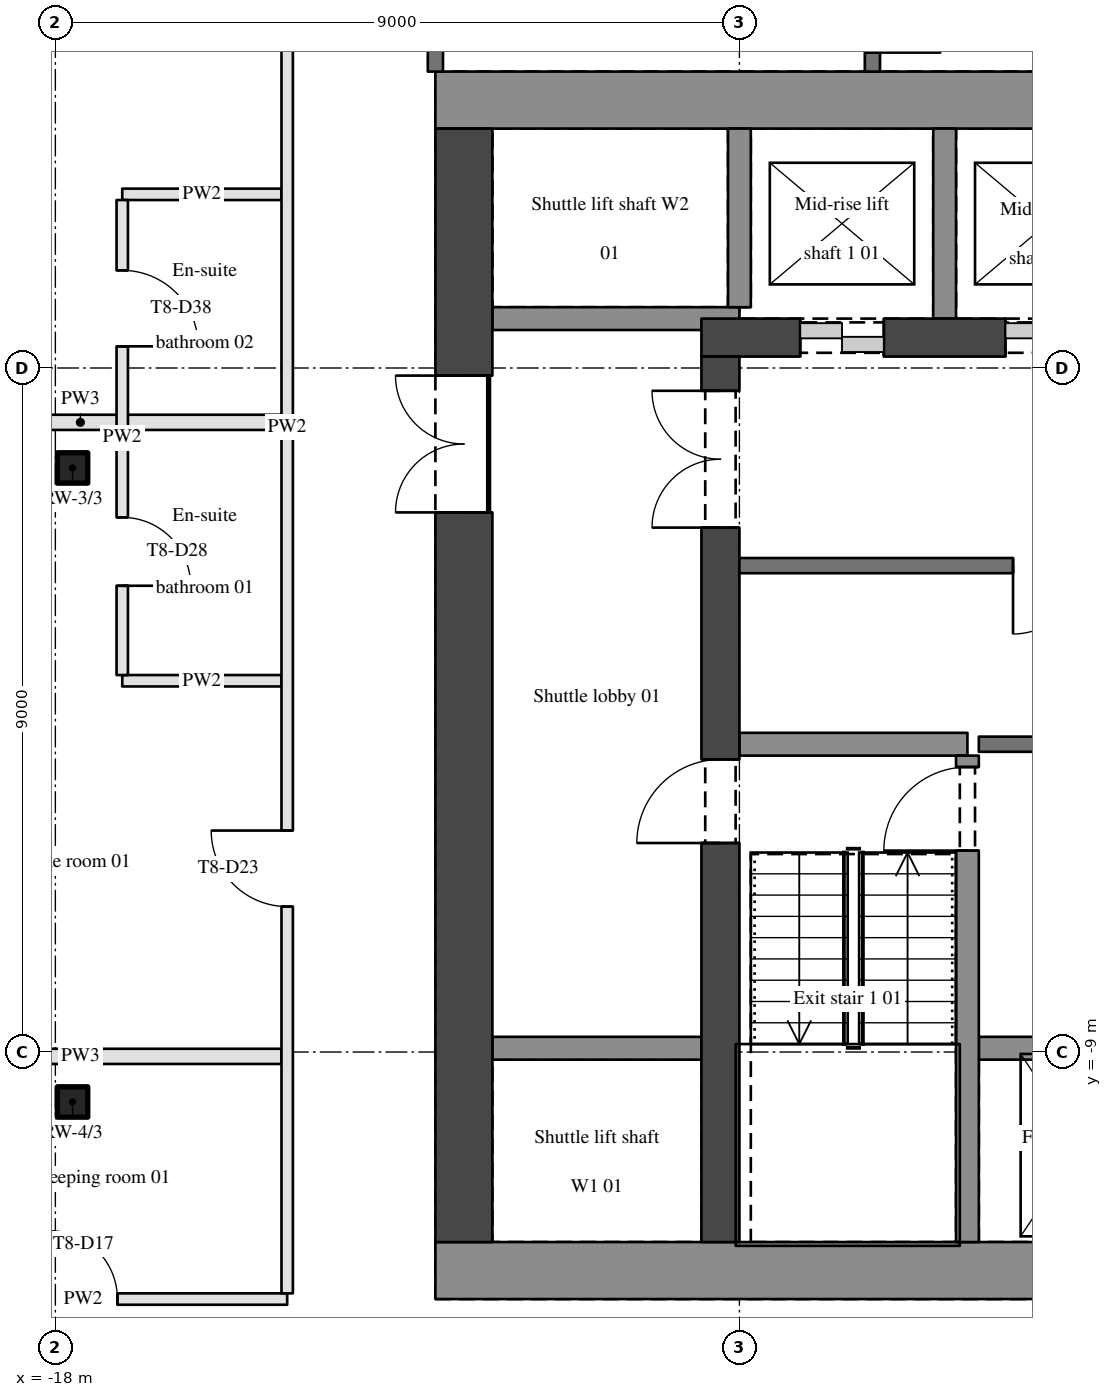
"""IFC4 building model, lengths in metres.
Left out: names, types, materials, properties, quantities, classifications, styles, units other than length and angle.
Written with IfcOpenShell. Run it as: python <this file> out.ifc"""

import sys

from ifc_helpers import new_model, si_unit, direction, frame, frame_2d, origin, origin_2d, place, context, subcontext, project, spatial, rectangle, hollow_rectangle, extrude, element, fill, save


model = new_model("IFC4")
c1 = context("Model", 3, precision=1e-05, world=origin(), true_north=direction((0.0, 1.0)))
c2 = subcontext(c1, "Body", "Model", "MODEL_VIEW")
j1 = project(units=[si_unit("LENGTHUNIT", "METRE"), si_unit("PLANEANGLEUNIT", "RADIAN")], contexts=[c1])
p1 = place(None, origin())
s1 = spatial("IfcSite", under=j1, at=p1, CompositionType="ELEMENT")
p2 = place(p1, origin())
s2 = spatial("IfcBuilding", under=s1, at=p2, CompositionType="ELEMENT")
p3 = place(p2, frame((0.0, 0.0, 121.5)))
s3 = spatial("IfcBuildingStorey", under=s2, at=p3, CompositionType="ELEMENT", Elevation=121.5)
for number, where, z_axis, x_axis in (
    (1, (-17.774, -1.315, 0.0), (0.0, 0.0, 1.0), (1.0, 0.0, 0.0)),
    (2, (-17.774, -9.657, 0.0), (0.0, 0.0, 1.0), (1.0, 0.0, 0.0)),
):
    element("IfcColumn", number, at=place(p3, frame(where, z_axis=z_axis, x_axis=x_axis)), inside=s3, PredefinedType="COLUMN", context=c2, shape_type="SweptSolid", body=[
        extrude(hollow_rectangle(XDim=0.4, YDim=0.4, WallThickness=0.02, InnerFilletRadius=0.03, OuterFilletRadius=0.05, at=origin_2d()), origin(), (0.0, 0.0, 1.0), 3.4),
    ])
for number, where, z_axis, x_axis in (
    (3, (-13.0, -11.875, 0.0), (0.0, 0.0, 1.0), (1.0, 0.0, 0.0)),
    (4, (-13.0, 3.525, 0.0), (0.0, 0.0, 1.0), (1.0, 0.0, 0.0)),
):
    element("IfcWall", number, at=place(p3, frame(where, z_axis=z_axis, x_axis=x_axis)), inside=s3, PredefinedType="SHEAR", context=c2, shape_type="SweptSolid", body=[
        extrude(rectangle(XDim=26.0, YDim=0.75, at=frame_2d((13.0, 0.0))), origin(), (0.0, 0.0, 1.0), 3.4),
    ])
p4 = place(p3, frame((-12.625, -11.5, 0.0), z_axis=(0.0, 0.0, 1.0), x_axis=(0.0, 1.0, 0.0)))
e5 = element("IfcWall", 5, at=p4, inside=s3, PredefinedType="SHEAR", context=c2, shape_type="SweptSolid", body=[
    extrude(rectangle(XDim=14.65, YDim=0.75, at=frame_2d((7.325, 0.0))), origin(), (0.0, 0.0, 1.0), 3.4),
])
p5 = place(p4, frame((9.6, 0.0, 0.0)))
e6 = element("IfcOpeningElement", 6, at=p5, cuts=e5, PredefinedType="OPENING", context=c2, shape_type="SweptSolid", body=[
    extrude(rectangle(XDim=1.8, YDim=2.1, at=frame_2d((0.9, 1.05))), frame((0.0, 0.385, 0.0), z_axis=(0.0, -1.0, 0.0), x_axis=(1.0, 0.0, 0.0)), (0.0, 0.0, 1.0), 0.77),
])
p6 = place(p3, frame((-9.5, 0.4, 0.0), z_axis=(0.0, 0.0, 1.0), x_axis=(1.0, 0.0, 0.0)))
e7 = element("IfcWall", 7, at=p6, inside=s3, PredefinedType="SHEAR", context=c2, shape_type="SweptSolid", body=[
    extrude(rectangle(XDim=19.0, YDim=0.5, at=frame_2d((9.5, 0.0))), origin(), (0.0, 0.0, 1.0), 3.4),
])
p7 = place(p6, frame((1.3, 0.0, 0.0)))
e8 = element("IfcOpeningElement", 8, at=p7, cuts=e7, PredefinedType="OPENING", context=c2, shape_type="SweptSolid", body=[
    extrude(rectangle(XDim=1.1, YDim=2.1, at=frame_2d((0.55, 1.05))), frame((0.0, 0.26, 0.0), z_axis=(0.0, -1.0, 0.0), x_axis=(1.0, 0.0, 0.0)), (0.0, 0.0, 1.0), 0.52),
])
p8 = place(p6, frame((4.0, 0.0, 0.0)))
e9 = element("IfcOpeningElement", 9, at=p8, cuts=e7, PredefinedType="OPENING", context=c2, shape_type="SweptSolid", body=[
    extrude(rectangle(XDim=1.1, YDim=2.1, at=frame_2d((0.55, 1.05))), frame((0.0, 0.26, 0.0), z_axis=(0.0, -1.0, 0.0), x_axis=(1.0, 0.0, 0.0)), (0.0, 0.0, 1.0), 0.52),
])
p9 = place(p6, frame((6.7, 0.0, 0.0)))
e10 = element("IfcOpeningElement", 10, at=p9, cuts=e7, PredefinedType="OPENING", context=c2, shape_type="SweptSolid", body=[
    extrude(rectangle(XDim=1.1, YDim=2.1, at=frame_2d((0.55, 1.05))), frame((0.0, 0.26, 0.0), z_axis=(0.0, -1.0, 0.0), x_axis=(1.0, 0.0, 0.0)), (0.0, 0.0, 1.0), 0.52),
])
p10 = place(p6, frame((11.2, 0.0, 0.0)))
e11 = element("IfcOpeningElement", 11, at=p10, cuts=e7, PredefinedType="OPENING", context=c2, shape_type="SweptSolid", body=[
    extrude(rectangle(XDim=1.1, YDim=2.1, at=frame_2d((0.55, 1.05))), frame((0.0, 0.26, 0.0), z_axis=(0.0, -1.0, 0.0), x_axis=(1.0, 0.0, 0.0)), (0.0, 0.0, 1.0), 0.52),
])
p11 = place(p6, frame((13.9, 0.0, 0.0)))
e12 = element("IfcOpeningElement", 12, at=p11, cuts=e7, PredefinedType="OPENING", context=c2, shape_type="SweptSolid", body=[
    extrude(rectangle(XDim=1.1, YDim=2.1, at=frame_2d((0.55, 1.05))), frame((0.0, 0.26, 0.0), z_axis=(0.0, -1.0, 0.0), x_axis=(1.0, 0.0, 0.0)), (0.0, 0.0, 1.0), 0.52),
])
p12 = place(p6, frame((16.6, 0.0, 0.0)))
e13 = element("IfcOpeningElement", 13, at=p12, cuts=e7, PredefinedType="OPENING", context=c2, shape_type="SweptSolid", body=[
    extrude(rectangle(XDim=1.1, YDim=2.1, at=frame_2d((0.55, 1.05))), frame((0.0, 0.26, 0.0), z_axis=(0.0, -1.0, 0.0), x_axis=(1.0, 0.0, 0.0)), (0.0, 0.0, 1.0), 0.52),
])
p13 = place(p3, frame((-9.25, -11.5, 0.0), z_axis=(0.0, 0.0, 1.0), x_axis=(0.0, 1.0, 0.0)))
e14 = element("IfcWall", 14, at=p13, inside=s3, PredefinedType="SHEAR", context=c2, shape_type="SweptSolid", body=[
    extrude(rectangle(XDim=11.65, YDim=0.5, at=frame_2d((5.825, 0.0))), origin(), (0.0, 0.0, 1.0), 3.4),
])
p14 = place(p13, frame((9.4, 0.0, 0.0)))
e15 = element("IfcOpeningElement", 15, at=p14, cuts=e14, PredefinedType="OPENING", context=c2, shape_type="SweptSolid", body=[
    extrude(rectangle(XDim=1.8, YDim=2.1, at=frame_2d((0.9, 1.05))), frame((0.0, 0.26, 0.0), z_axis=(0.0, -1.0, 0.0), x_axis=(1.0, 0.0, 0.0)), (0.0, 0.0, 1.0), 0.52),
])
p15 = place(p13, frame((5.25, 0.0, 0.0)))
e16 = element("IfcOpeningElement", 16, at=p15, cuts=e14, PredefinedType="OPENING", context=c2, shape_type="SweptSolid", body=[
    extrude(rectangle(XDim=1.1, YDim=2.1, at=frame_2d((0.55, 1.05))), frame((0.0, 0.26, 0.0), z_axis=(0.0, -1.0, 0.0), x_axis=(1.0, 0.0, 0.0)), (0.0, 0.0, 1.0), 0.52),
])
p16 = place(p3, frame((-20.317, -12.25, 0.0), z_axis=(0.0, 0.0, 1.0), x_axis=(1.0, 0.0, 0.0)))
e17 = element("IfcWall", 17, at=p16, inside=s3, PredefinedType="PARTITIONING", context=c2, shape_type="SweptSolid", body=[
    extrude(rectangle(XDim=5.367, YDim=0.15, at=frame_2d((2.684, 0.0))), origin(), (0.0, 0.0, 1.0), 2.46),
])
p17 = place(p16, frame((2.233, 0.0, 0.0)))
e18 = element("IfcOpeningElement", 18, at=p17, cuts=e17, PredefinedType="OPENING", context=c2, shape_type="SweptSolid", body=[
    extrude(rectangle(XDim=0.9, YDim=2.1, at=frame_2d((0.45, 1.05))), frame((0.0, 0.085, 0.0), z_axis=(0.0, -1.0, 0.0), x_axis=(1.0, 0.0, 0.0)), (0.0, 0.0, 1.0), 0.17),
])
p18 = place(p3, frame((-20.317, -9.057, 0.0), z_axis=(0.0, 0.0, 1.0), x_axis=(1.0, 0.0, 0.0)))
e19 = element("IfcWall", 19, at=p18, inside=s3, PredefinedType="PARTITIONING", context=c2, shape_type="SweptSolid", body=[
    extrude(rectangle(XDim=5.292, YDim=0.2, at=frame_2d((2.646, 0.0))), origin(), (0.0, 0.0, 1.0), 2.46),
])
p19 = place(p3, frame((-12.25, -8.95, 0.0), z_axis=(0.0, 0.0, 1.0), x_axis=(1.0, 0.0, 0.0)))
e20 = element("IfcWall", 20, at=p19, inside=s3, PredefinedType="SHEAR", context=c2, shape_type="SweptSolid", body=[
    extrude(rectangle(XDim=2.75, YDim=0.3, at=frame_2d((1.375, 0.0))), origin(), (0.0, 0.0, 1.0), 3.4),
])
p20 = place(p3, frame((-5.85, -8.95, 0.0), z_axis=(0.0, 0.0, 1.0), x_axis=(1.0, 0.0, 0.0)))
e21 = element("IfcWall", 21, at=p20, inside=s3, PredefinedType="SHEAR", context=c2, shape_type="SweptSolid", body=[
    extrude(rectangle(XDim=11.7, YDim=0.3, at=frame_2d((5.85, 0.0))), origin(), (0.0, 0.0, 1.0), 3.4),
])
p21 = place(p20, frame((0.8, 0.0, 0.0)))
e22 = element("IfcOpeningElement", 22, at=p21, cuts=e21, PredefinedType="OPENING", context=c2, shape_type="SweptSolid", body=[
    extrude(rectangle(XDim=1.1, YDim=2.1, at=frame_2d((0.55, 1.05))), frame((0.0, 0.16, 0.0), z_axis=(0.0, -1.0, 0.0), x_axis=(1.0, 0.0, 0.0)), (0.0, 0.0, 1.0), 0.32),
])
p22 = place(p20, frame((3.8, 0.0, 0.0)))
e23 = element("IfcOpeningElement", 23, at=p22, cuts=e21, PredefinedType="OPENING", context=c2, shape_type="SweptSolid", body=[
    extrude(rectangle(XDim=1.1, YDim=2.1, at=frame_2d((0.55, 1.05))), frame((0.0, 0.16, 0.0), z_axis=(0.0, -1.0, 0.0), x_axis=(1.0, 0.0, 0.0)), (0.0, 0.0, 1.0), 0.32),
])
p23 = place(p20, frame((6.8, 0.0, 0.0)))
e24 = element("IfcOpeningElement", 24, at=p23, cuts=e21, PredefinedType="OPENING", context=c2, shape_type="SweptSolid", body=[
    extrude(rectangle(XDim=1.1, YDim=2.1, at=frame_2d((0.55, 1.05))), frame((0.0, 0.16, 0.0), z_axis=(0.0, -1.0, 0.0), x_axis=(1.0, 0.0, 0.0)), (0.0, 0.0, 1.0), 0.32),
])
p24 = place(p20, frame((9.8, 0.0, 0.0)))
e25 = element("IfcOpeningElement", 25, at=p24, cuts=e21, PredefinedType="OPENING", context=c2, shape_type="SweptSolid", body=[
    extrude(rectangle(XDim=1.1, YDim=2.1, at=frame_2d((0.55, 1.05))), frame((0.0, 0.16, 0.0), z_axis=(0.0, -1.0, 0.0), x_axis=(1.0, 0.0, 0.0)), (0.0, 0.0, 1.0), 0.32),
])
p25 = place(p3, frame((-9.0, -4.95, 0.0), z_axis=(0.0, 0.0, 1.0), x_axis=(1.0, 0.0, 0.0)))
e26 = element("IfcWall", 26, at=p25, inside=s3, PredefinedType="SHEAR", context=c2, shape_type="SweptSolid", body=[
    extrude(rectangle(XDim=3.0, YDim=0.3, at=frame_2d((1.5, 0.0))), origin(), (0.0, 0.0, 1.0), 3.4),
])
p26 = place(p3, frame((-5.85, -4.95, 0.0), z_axis=(0.0, 0.0, 1.0), x_axis=(1.0, 0.0, 0.0)))
e27 = element("IfcWall", 27, at=p26, inside=s3, PredefinedType="SOLIDWALL", context=c2, shape_type="SweptSolid", body=[
    extrude(rectangle(XDim=4.95, YDim=0.2, at=frame_2d((2.475, 0.0))), origin(), (0.0, 0.0, 1.0), 3.1),
])
p27 = place(p3, frame((-17.12, -4.115, 0.0), z_axis=(0.0, 0.0, 1.0), x_axis=(1.0, 0.0, 0.0)))
e28 = element("IfcWall", 28, at=p27, inside=s3, PredefinedType="PARTITIONING", context=c2, shape_type="SweptSolid", body=[
    extrude(rectangle(XDim=2.095, YDim=0.15, at=frame_2d((1.048, 0.0))), origin(), (0.0, 0.0, 1.0), 2.46),
])
p28 = place(p3, frame((9.0, -2.6, 0.0), z_axis=(0.0, 0.0, 1.0), x_axis=(-1.0, 0.0, 0.0)))
e29 = element("IfcWall", 29, at=p28, inside=s3, PredefinedType="SOLIDWALL", context=c2, shape_type="SweptSolid", body=[
    extrude(rectangle(XDim=18.0, YDim=0.2, at=frame_2d((9.0, 0.0))), origin(), (0.0, 0.0, 1.0), 3.1),
])
p29 = place(p28, frame((8.5, 0.0, 0.0)))
e30 = element("IfcOpeningElement", 30, at=p29, cuts=e29, PredefinedType="OPENING", context=c2, shape_type="SweptSolid", body=[
    extrude(rectangle(XDim=1.0, YDim=2.1, at=frame_2d((0.5, 1.05))), frame((0.0, 0.11, 0.0), z_axis=(0.0, -1.0, 0.0), x_axis=(1.0, 0.0, 0.0)), (0.0, 0.0, 1.0), 0.22),
])
p30 = place(p28, frame((13.5, 0.0, 0.0)))
e31 = element("IfcOpeningElement", 31, at=p30, cuts=e29, PredefinedType="OPENING", context=c2, shape_type="SweptSolid", body=[
    extrude(rectangle(XDim=0.9, YDim=2.1, at=frame_2d((0.45, 1.05))), frame((0.0, 0.11, 0.0), z_axis=(0.0, -1.0, 0.0), x_axis=(1.0, 0.0, 0.0)), (0.0, 0.0, 1.0), 0.22),
])
p31 = place(p28, frame((3.6, 0.0, 0.0)))
e32 = element("IfcOpeningElement", 32, at=p31, cuts=e29, PredefinedType="OPENING", context=c2, shape_type="SweptSolid", body=[
    extrude(rectangle(XDim=0.9, YDim=2.1, at=frame_2d((0.45, 1.05))), frame((0.0, 0.11, 0.0), z_axis=(0.0, -1.0, 0.0), x_axis=(1.0, 0.0, 0.0)), (0.0, 0.0, 1.0), 0.22),
])
p32 = place(p3, frame((-20.317, -0.715, 0.0), z_axis=(0.0, 0.0, 1.0), x_axis=(1.0, 0.0, 0.0)))
e33 = element("IfcWall", 33, at=p32, inside=s3, PredefinedType="PARTITIONING", context=c2, shape_type="SweptSolid", body=[
    extrude(rectangle(XDim=5.292, YDim=0.2, at=frame_2d((2.646, 0.0))), origin(), (0.0, 0.0, 1.0), 2.46),
])
p33 = place(p3, frame((-9.0, 0.65, 0.0), z_axis=(0.0, 0.0, 1.0), x_axis=(-1.0, 0.0, 0.0)))
e34 = element("IfcWall", 34, at=p33, inside=s3, PredefinedType="SHEAR", context=c2, shape_type="SweptSolid", body=[
    extrude(rectangle(XDim=3.25, YDim=0.3, at=frame_2d((1.625, 0.0))), origin(), (0.0, 0.0, 1.0), 3.4),
])
p34 = place(p3, frame((-17.12, 2.285, 0.0), z_axis=(0.0, 0.0, 1.0), x_axis=(1.0, 0.0, 0.0)))
e35 = element("IfcWall", 35, at=p34, inside=s3, PredefinedType="PARTITIONING", context=c2, shape_type="SweptSolid", body=[
    extrude(rectangle(XDim=2.095, YDim=0.15, at=frame_2d((1.048, 0.0))), origin(), (0.0, 0.0, 1.0), 2.46),
])
p35 = place(p3, frame((-17.12, 2.21, 0.0), z_axis=(0.0, 0.0, 1.0), x_axis=(0.0, -1.0, 0.0)))
e36 = element("IfcWall", 36, at=p35, inside=s3, PredefinedType="PARTITIONING", context=c2, shape_type="SweptSolid", body=[
    extrude(rectangle(XDim=6.25, YDim=0.15, at=frame_2d((3.125, 0.0))), origin(), (0.0, 0.0, 1.0), 2.46),
])
p36 = place(p35, frame((4.175, 0.0, 0.0)))
e37 = element("IfcOpeningElement", 37, at=p36, cuts=e36, PredefinedType="OPENING", context=c2, shape_type="SweptSolid", body=[
    extrude(rectangle(XDim=0.9, YDim=2.1, at=frame_2d((0.45, 1.05))), frame((0.0, 0.085, 0.0), z_axis=(0.0, -1.0, 0.0), x_axis=(1.0, 0.0, 0.0)), (0.0, 0.0, 1.0), 0.17),
])
p37 = place(p35, frame((0.925, 0.0, 0.0)))
e38 = element("IfcOpeningElement", 38, at=p37, cuts=e36, PredefinedType="OPENING", context=c2, shape_type="SweptSolid", body=[
    extrude(rectangle(XDim=1.0, YDim=2.1, at=frame_2d((0.5, 1.05))), frame((0.0, 0.085, 0.0), z_axis=(0.0, -1.0, 0.0), x_axis=(1.0, 0.0, 0.0)), (0.0, 0.0, 1.0), 0.17),
])
p38 = place(p3, frame((-14.95, -12.175, 0.0), z_axis=(0.0, 0.0, 1.0), x_axis=(0.0, 1.0, 0.0)))
e39 = element("IfcWall", 39, at=p38, inside=s3, PredefinedType="PARTITIONING", context=c2, shape_type="SweptSolid", body=[
    extrude(rectangle(XDim=22.8, YDim=0.15, at=frame_2d((11.4, 0.0))), origin(), (0.0, 0.0, 1.0), 2.46),
])
p39 = place(p38, frame((5.089, 0.0, 0.0)))
e40 = element("IfcOpeningElement", 40, at=p39, cuts=e39, PredefinedType="OPENING", context=c2, shape_type="SweptSolid", body=[
    extrude(rectangle(XDim=1.0, YDim=2.1, at=frame_2d((0.5, 1.05))), frame((0.0, 0.085, 0.0), z_axis=(0.0, -1.0, 0.0), x_axis=(1.0, 0.0, 0.0)), (0.0, 0.0, 1.0), 0.17),
])
p40 = place(p38, frame((16.631, 0.0, 0.0)))
e41 = element("IfcOpeningElement", 41, at=p40, cuts=e39, PredefinedType="OPENING", context=c2, shape_type="SweptSolid", body=[
    extrude(rectangle(XDim=1.0, YDim=2.1, at=frame_2d((0.5, 1.05))), frame((0.0, 0.085, 0.0), z_axis=(0.0, -1.0, 0.0), x_axis=(1.0, 0.0, 0.0)), (0.0, 0.0, 1.0), 0.17),
])
p41 = place(p3, frame((-13.0, 3.9, 0.0), z_axis=(0.0, 0.0, 1.0), x_axis=(0.0, 1.0, 0.0)))
e42 = element("IfcWall", 42, at=p41, inside=s3, PredefinedType="SOLIDWALL", context=c2, shape_type="SweptSolid", body=[
    extrude(rectangle(XDim=6.7, YDim=0.2, at=frame_2d((3.35, 0.0))), origin(), (0.0, 0.0, 1.0), 2.46),
])
p42 = place(p3, frame((-9.0, 0.8, 0.0), z_axis=(0.0, 0.0, 1.0), x_axis=(0.0, 1.0, 0.0)))
e43 = element("IfcWall", 43, at=p42, inside=s3, PredefinedType="SHEAR", context=c2, shape_type="SweptSolid", body=[
    extrude(rectangle(XDim=2.35, YDim=0.3, at=frame_2d((1.175, 0.0))), origin(), (0.0, 0.0, 1.0), 3.4),
])
p43 = place(p3, frame((-7.25, 5.3, 0.0), z_axis=(0.0, 0.0, 1.0), x_axis=(0.0, -1.0, 0.0)))
e44 = element("IfcWall", 44, at=p43, inside=s3, PredefinedType="SOLIDWALL", context=c2, shape_type="SweptSolid", body=[
    extrude(rectangle(XDim=1.4, YDim=0.2, at=frame_2d((0.7, 0.0))), origin(), (0.0, 0.0, 1.0), 2.46),
])
p44 = place(p43, frame((0.25, 0.0, 0.0)))
e45 = element("IfcOpeningElement", 45, at=p44, cuts=e44, PredefinedType="OPENING", context=c2, shape_type="SweptSolid", body=[
    extrude(rectangle(XDim=0.9, YDim=2.1, at=frame_2d((0.45, 1.05))), frame((0.0, 0.11, 0.0), z_axis=(0.0, -1.0, 0.0), x_axis=(1.0, 0.0, 0.0)), (0.0, 0.0, 1.0), 0.22),
])
p45 = place(p3, frame((-6.3, 0.65, 0.0), z_axis=(0.0, 0.0, 1.0), x_axis=(0.0, 1.0, 0.0)))
e46 = element("IfcWall", 46, at=p45, inside=s3, PredefinedType="SHEAR", context=c2, shape_type="SweptSolid", body=[
    extrude(rectangle(XDim=2.5, YDim=0.3, at=frame_2d((1.25, 0.0))), origin(), (0.0, 0.0, 1.0), 3.4),
])
p46 = place(p3, frame((-6.0, -11.5, 0.0), z_axis=(0.0, 0.0, 1.0), x_axis=(0.0, 1.0, 0.0)))
e47 = element("IfcWall", 47, at=p46, inside=s3, PredefinedType="SHEAR", context=c2, shape_type="SweptSolid", body=[
    extrude(rectangle(XDim=6.4, YDim=0.3, at=frame_2d((3.2, 0.0))), origin(), (0.0, 0.0, 1.0), 3.4),
])
p47 = place(p46, frame((5.15, 0.0, 0.0)))
e48 = element("IfcOpeningElement", 48, at=p47, cuts=e47, PredefinedType="OPENING", context=c2, shape_type="SweptSolid", body=[
    extrude(rectangle(XDim=1.1, YDim=2.1, at=frame_2d((0.55, 1.05))), frame((0.0, 0.16, 0.0), z_axis=(0.0, -1.0, 0.0), x_axis=(1.0, 0.0, 0.0)), (0.0, 0.0, 1.0), 0.32),
])
p48 = place(p5, origin())
e49 = element("IfcDoor", 49, at=p48, inside=s3, OperationType="DOUBLE_DOOR_SINGLE_SWING", PredefinedType="DOOR", context=c2, shape_type="SweptSolid", body=[
    extrude(rectangle(XDim=1.8, YDim=2.1, at=frame_2d((0.9, 1.05))), frame((0.0, 0.025, 0.0), z_axis=(0.0, -1.0, 0.0), x_axis=(1.0, 0.0, 0.0)), (0.0, 0.0, 1.0), 0.05),
])
fill(e6, e49)
p49 = place(p14, origin())
e50 = element("IfcDoor", 50, at=p49, inside=s3, OperationType="DOUBLE_DOOR_SINGLE_SWING", PredefinedType="DOOR", context=c2, shape_type="SweptSolid", body=[
    extrude(rectangle(XDim=1.8, YDim=2.1, at=frame_2d((0.9, 1.05))), frame((0.0, 0.025, 0.0), z_axis=(0.0, -1.0, 0.0), x_axis=(1.0, 0.0, 0.0)), (0.0, 0.0, 1.0), 0.05),
])
fill(e15, e50)
p50 = place(p47, origin())
e51 = element("IfcDoor", 51, at=p50, inside=s3, OperationType="SINGLE_SWING_LEFT", PredefinedType="DOOR", context=c2, shape_type="SweptSolid", body=[
    extrude(rectangle(XDim=1.1, YDim=2.1, at=frame_2d((0.55, 1.05))), frame((0.0, 0.025, 0.0), z_axis=(0.0, -1.0, 0.0), x_axis=(1.0, 0.0, 0.0)), (0.0, 0.0, 1.0), 0.05),
])
fill(e48, e51)
p51 = place(p15, origin())
e52 = element("IfcDoor", 52, at=p51, inside=s3, OperationType="SINGLE_SWING_LEFT", PredefinedType="DOOR", context=c2, shape_type="SweptSolid", body=[
    extrude(rectangle(XDim=1.1, YDim=2.1, at=frame_2d((0.55, 1.05))), frame((0.0, 0.025, 0.0), z_axis=(0.0, -1.0, 0.0), x_axis=(1.0, 0.0, 0.0)), (0.0, 0.0, 1.0), 0.05),
])
fill(e16, e52)
p52 = place(p30, origin())
e53 = element("IfcDoor", 53, at=p52, inside=s3, OperationType="SINGLE_SWING_RIGHT", PredefinedType="DOOR", context=c2, shape_type="SweptSolid", body=[
    extrude(rectangle(XDim=0.9, YDim=2.1, at=frame_2d((0.45, 1.05))), frame((0.0, 0.025, 0.0), z_axis=(0.0, -1.0, 0.0), x_axis=(1.0, 0.0, 0.0)), (0.0, 0.0, 1.0), 0.05),
])
fill(e31, e53)
p53 = place(p17, origin())
e54 = element("IfcDoor", 54, at=p53, inside=s3, OperationType="SINGLE_SWING_LEFT", PredefinedType="DOOR", context=c2, shape_type="SweptSolid", body=[
    extrude(rectangle(XDim=0.9, YDim=2.1, at=frame_2d((0.45, 1.05))), frame((0.0, 0.025, 0.0), z_axis=(0.0, -1.0, 0.0), x_axis=(1.0, 0.0, 0.0)), (0.0, 0.0, 1.0), 0.05),
])
fill(e18, e54)
p54 = place(p39, origin())
e55 = element("IfcDoor", 55, at=p54, inside=s3, OperationType="SINGLE_SWING_RIGHT", PredefinedType="DOOR", context=c2, shape_type="SweptSolid", body=[
    extrude(rectangle(XDim=1.0, YDim=2.1, at=frame_2d((0.5, 1.05))), frame((0.0, 0.025, 0.0), z_axis=(0.0, -1.0, 0.0), x_axis=(1.0, 0.0, 0.0)), (0.0, 0.0, 1.0), 0.05),
])
fill(e40, e55)
p55 = place(p36, origin())
e56 = element("IfcDoor", 56, at=p55, inside=s3, OperationType="SINGLE_SWING_RIGHT", PredefinedType="DOOR", context=c2, shape_type="SweptSolid", body=[
    extrude(rectangle(XDim=0.9, YDim=2.1, at=frame_2d((0.45, 1.05))), frame((0.0, 0.025, 0.0), z_axis=(0.0, -1.0, 0.0), x_axis=(1.0, 0.0, 0.0)), (0.0, 0.0, 1.0), 0.05),
])
fill(e37, e56)
p56 = place(p37, origin())
e57 = element("IfcDoor", 57, at=p56, inside=s3, OperationType="SINGLE_SWING_RIGHT", PredefinedType="DOOR", context=c2, shape_type="SweptSolid", body=[
    extrude(rectangle(XDim=1.0, YDim=2.1, at=frame_2d((0.5, 1.05))), frame((0.0, 0.025, 0.0), z_axis=(0.0, -1.0, 0.0), x_axis=(1.0, 0.0, 0.0)), (0.0, 0.0, 1.0), 0.05),
])
fill(e38, e57)
p57 = place(p7, origin())
e58 = element("IfcDoor", 58, at=p57, inside=s3, OperationType="DOUBLE_DOOR_SLIDING", PredefinedType="DOOR", context=c2, shape_type="SweptSolid", body=[
    extrude(rectangle(XDim=1.1, YDim=2.1, at=frame_2d((0.55, 1.05))), frame((0.0, 0.025, 0.0), z_axis=(0.0, -1.0, 0.0), x_axis=(1.0, 0.0, 0.0)), (0.0, 0.0, 1.0), 0.05),
])
fill(e8, e58)
p58 = place(p8, origin())
e59 = element("IfcDoor", 59, at=p58, inside=s3, OperationType="DOUBLE_DOOR_SLIDING", PredefinedType="DOOR", context=c2, shape_type="SweptSolid", body=[
    extrude(rectangle(XDim=1.1, YDim=2.1, at=frame_2d((0.55, 1.05))), frame((0.0, 0.025, 0.0), z_axis=(0.0, -1.0, 0.0), x_axis=(1.0, 0.0, 0.0)), (0.0, 0.0, 1.0), 0.05),
])
fill(e9, e59)
save(model, sys.argv[1])
